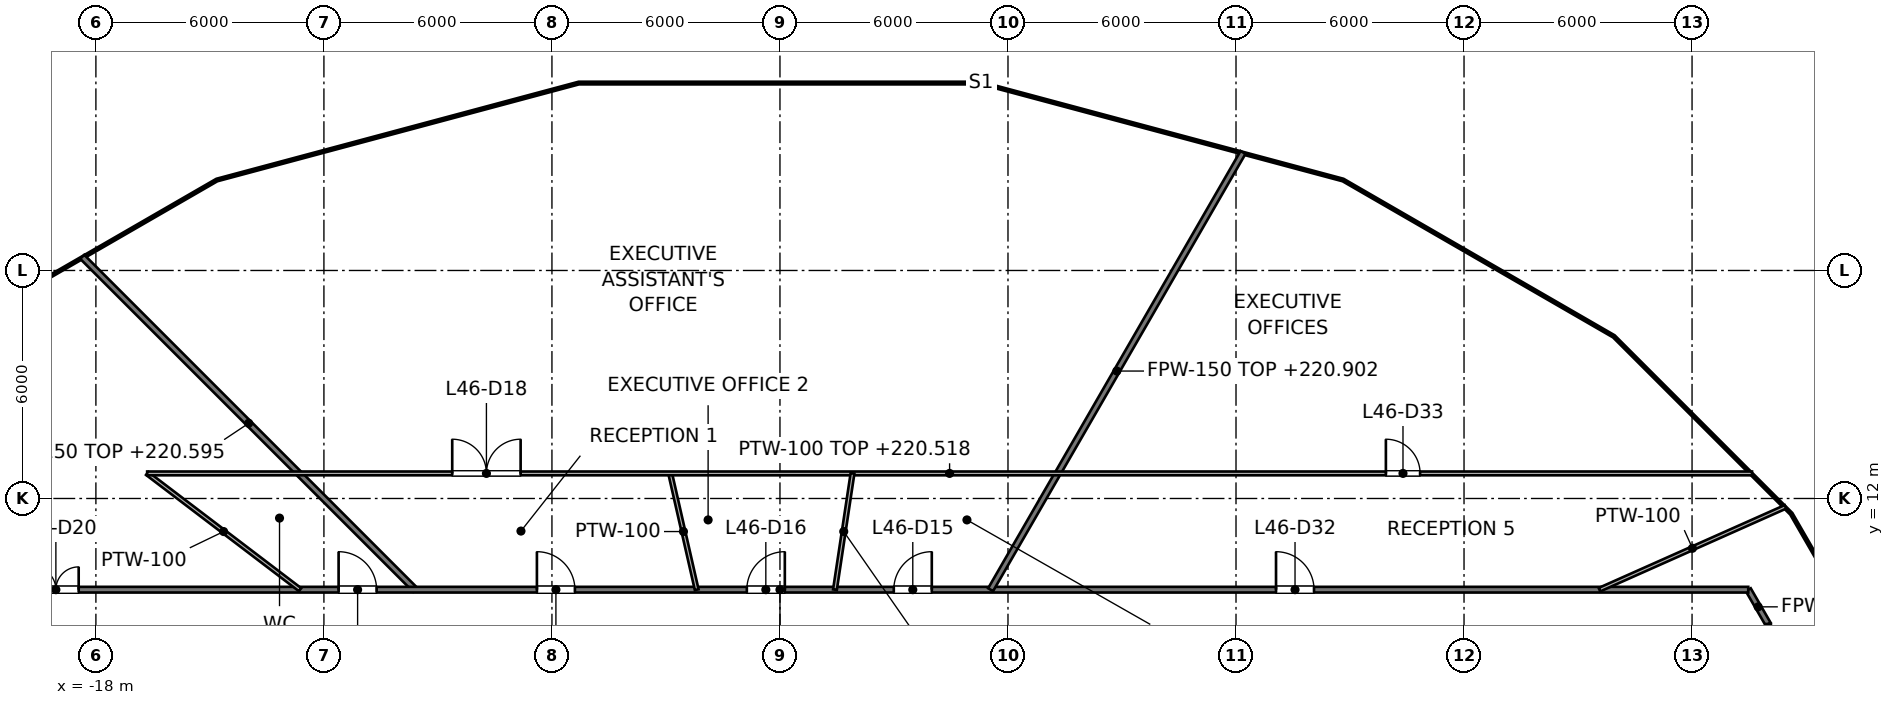
"""IFC4 building model, lengths in metres.
Left out: names, types, materials, properties, quantities, classifications, styles, units other than length and angle.
Written with IfcOpenShell. Run it as: python <this file> out.ifc"""

import sys

from ifc_helpers import new_model, si_unit, direction, frame, frame_2d, origin, place, context, subcontext, project, spatial, rectangle, extrude, element, fill, save


model = new_model("IFC4")
c1 = context("Model", 3, precision=1e-05, world=origin(), true_north=direction((0.0, 1.0)))
c2 = subcontext(c1, "Body", "Model", "MODEL_VIEW")
j1 = project(units=[si_unit("LENGTHUNIT", "METRE"), si_unit("PLANEANGLEUNIT", "RADIAN")], contexts=[c1])
p1 = place(None, origin())
s1 = spatial("IfcSite", under=j1, at=p1, CompositionType="ELEMENT")
p2 = place(p1, origin())
s2 = spatial("IfcBuilding", under=s1, at=p2, CompositionType="ELEMENT")
p3 = place(p2, frame((0.0, 0.0, 217.6)))
s3 = spatial("IfcBuildingStorey", under=s2, at=p3, CompositionType="ELEMENT", Elevation=217.6)
p4 = place(p3, frame((25.479, 9.6, 0.0), z_axis=(0.0, 0.0, 1.0), x_axis=(0.499715696113, -0.8661894845, 0.0)))
e1 = element("IfcWall", 1, at=p4, inside=s3, PredefinedType="PARTITIONING", context=c2, shape_type="SweptSolid", body=[
    extrude(rectangle(XDim=1.042, YDim=0.15, at=frame_2d((0.521, 0.0))), origin(), (0.0, 0.0, 1.0), 2.927),
])
p5 = place(p3, frame((-18.359, 18.359, 0.0), z_axis=(0.0, 0.0, 1.0), x_axis=(0.707106781187, -0.707106781187, 0.0)))
e2 = element("IfcWall", 2, at=p5, inside=s3, PredefinedType="PARTITIONING", context=c2, shape_type="SweptSolid", body=[
    extrude(rectangle(XDim=12.387, YDim=0.15, at=frame_2d((6.193, 0.0))), origin(), (0.0, 0.0, 1.0), 2.995),
])
p6 = place(p3, frame((-25.479, 9.6, 0.0), z_axis=(0.0, 0.0, 1.0), x_axis=(1.0, 0.0, 0.0)))
e3 = element("IfcWall", 3, at=p6, inside=s3, PredefinedType="PARTITIONING", context=c2, shape_type="SweptSolid", body=[
    extrude(rectangle(XDim=50.958, YDim=0.15, at=frame_2d((25.479, 0.0))), origin(), (0.0, 0.0, 1.0), 2.918),
])
p7 = place(p6, frame((28.474, 0.0, 0.0)))
e4 = element("IfcOpeningElement", 4, at=p7, cuts=e3, PredefinedType="OPENING", context=c2, shape_type="SweptSolid", body=[
    extrude(rectangle(XDim=1.0, YDim=2.1, at=frame_2d((0.5, 1.05))), frame((0.0, 0.075, 0.0), z_axis=(0.0, -1.0, 0.0), x_axis=(1.0, 0.0, 0.0)), (0.0, 0.0, 1.0), 0.15),
])
p8 = place(p6, frame((24.607, 0.0, 0.0)))
e5 = element("IfcOpeningElement", 5, at=p8, cuts=e3, PredefinedType="OPENING", context=c2, shape_type="SweptSolid", body=[
    extrude(rectangle(XDim=1.0, YDim=2.1, at=frame_2d((0.5, 1.05))), frame((0.0, 0.075, 0.0), z_axis=(0.0, -1.0, 0.0), x_axis=(1.0, 0.0, 0.0)), (0.0, 0.0, 1.0), 0.15),
])
p9 = place(p6, frame((19.083, 0.0, 0.0)))
e6 = element("IfcOpeningElement", 6, at=p9, cuts=e3, PredefinedType="OPENING", context=c2, shape_type="SweptSolid", body=[
    extrude(rectangle(XDim=1.0, YDim=2.1, at=frame_2d((0.5, 1.05))), frame((0.0, 0.075, 0.0), z_axis=(0.0, -1.0, 0.0), x_axis=(1.0, 0.0, 0.0)), (0.0, 0.0, 1.0), 0.15),
])
p10 = place(p6, frame((13.865, 0.0, 0.0)))
e7 = element("IfcOpeningElement", 7, at=p10, cuts=e3, PredefinedType="OPENING", context=c2, shape_type="SweptSolid", body=[
    extrude(rectangle(XDim=1.0, YDim=2.1, at=frame_2d((0.5, 1.05))), frame((0.0, 0.075, 0.0), z_axis=(0.0, -1.0, 0.0), x_axis=(1.0, 0.0, 0.0)), (0.0, 0.0, 1.0), 0.15),
])
p11 = place(p6, frame((5.826, 0.0, 0.0)))
e8 = element("IfcOpeningElement", 8, at=p11, cuts=e3, PredefinedType="OPENING", context=c2, shape_type="SweptSolid", body=[
    extrude(rectangle(XDim=1.2, YDim=2.1, at=frame_2d((0.6, 1.05))), frame((0.0, 0.075, 0.0), z_axis=(0.0, -1.0, 0.0), x_axis=(1.0, 0.0, 0.0)), (0.0, 0.0, 1.0), 0.15),
])
p12 = place(p6, frame((38.532, 0.0, 0.0)))
e9 = element("IfcOpeningElement", 9, at=p12, cuts=e3, PredefinedType="OPENING", context=c2, shape_type="SweptSolid", body=[
    extrude(rectangle(XDim=1.0, YDim=2.1, at=frame_2d((0.5, 1.05))), frame((0.0, 0.075, 0.0), z_axis=(0.0, -1.0, 0.0), x_axis=(1.0, 0.0, 0.0)), (0.0, 0.0, 1.0), 0.15),
])
p13 = place(p3, frame((5.543, 9.6, 0.0), z_axis=(0.0, 0.0, 1.0), x_axis=(0.499894249903, 0.866086450023, 0.0)))
e10 = element("IfcWall", 10, at=p13, inside=s3, PredefinedType="PARTITIONING", context=c2, shape_type="SweptSolid", body=[
    extrude(rectangle(XDim=13.286, YDim=0.15, at=frame_2d((6.643, 0.0))), origin(), (0.0, 0.0, 1.0), 3.302),
])
p14 = place(p3, frame((26.0, 6.8, 0.0), z_axis=(0.0, 0.0, 1.0), x_axis=(0.0, 1.0, 0.0)))
e11 = element("IfcWall", 11, at=p14, inside=s3, PredefinedType="PARTITIONING", context=c2, shape_type="SweptSolid", body=[
    extrude(rectangle(XDim=1.897, YDim=0.15, at=frame_2d((0.948, 0.0))), origin(), (0.0, 0.0, 1.0), 2.927),
])
p15 = place(p3, frame((-2.889, 12.66, 0.0), z_axis=(0.0, 0.0, 1.0), x_axis=(0.222404443897, -0.974954492956, 0.0)))
e12 = element("IfcWall", 12, at=p15, inside=s3, PredefinedType="PARTITIONING", context=c2, shape_type="SweptSolid", body=[
    extrude(rectangle(XDim=3.138, YDim=0.1, at=frame_2d((1.569, 0.0))), origin(), (0.0, 0.0, 1.0), 2.927),
])
p16 = place(p3, frame((-16.651, 12.66, 0.0), z_axis=(0.0, 0.0, 1.0), x_axis=(0.796006750332, -0.605287744322, 0.0)))
e13 = element("IfcWall", 13, at=p16, inside=s3, PredefinedType="PARTITIONING", context=c2, shape_type="SweptSolid", body=[
    extrude(rectangle(XDim=5.055, YDim=0.1, at=frame_2d((2.528, 0.0))), origin(), (0.0, 0.0, 1.0), 2.927),
])
p17 = place(p3, frame((-16.651, 12.66, 0.0), z_axis=(0.0, 0.0, 1.0), x_axis=(1.0, 0.0, 0.0)))
e14 = element("IfcWall", 14, at=p17, inside=s3, PredefinedType="PARTITIONING", context=c2, shape_type="SweptSolid", body=[
    extrude(rectangle(XDim=42.229, YDim=0.1, at=frame_2d((21.114, 0.0))), origin(), (0.0, 0.0, 1.0), 2.918),
])
p18 = place(p17, frame((8.027, 0.0, 0.0)))
e15 = element("IfcOpeningElement", 15, at=p18, cuts=e14, PredefinedType="OPENING", context=c2, shape_type="SweptSolid", body=[
    extrude(rectangle(XDim=1.8, YDim=2.1, at=frame_2d((0.9, 1.05))), frame((0.0, 0.05, 0.0), z_axis=(0.0, -1.0, 0.0), x_axis=(1.0, 0.0, 0.0)), (0.0, 0.0, 1.0), 0.1),
])
p19 = place(p17, frame((32.595, 0.0, 0.0)))
e16 = element("IfcOpeningElement", 16, at=p19, cuts=e14, PredefinedType="OPENING", context=c2, shape_type="SweptSolid", body=[
    extrude(rectangle(XDim=0.9, YDim=2.1, at=frame_2d((0.45, 1.05))), frame((0.0, 0.05, 0.0), z_axis=(0.0, -1.0, 0.0), x_axis=(1.0, 0.0, 0.0)), (0.0, 0.0, 1.0), 0.1),
])
p20 = place(p3, frame((21.563, 9.6, 0.0), z_axis=(0.0, 0.0, 1.0), x_axis=(0.913508804139, 0.406818958212, 0.0)))
e17 = element("IfcWall", 17, at=p20, inside=s3, PredefinedType="PARTITIONING", context=c2, shape_type="SweptSolid", body=[
    extrude(rectangle(XDim=5.358, YDim=0.1, at=frame_2d((2.679, 0.0))), origin(), (0.0, 0.0, 1.0), 2.927),
])
p21 = place(p3, frame((1.447, 9.6, 0.0), z_axis=(0.0, 0.0, 1.0), x_axis=(0.149270157498, 0.988796450277, 0.0)))
e18 = element("IfcWall", 18, at=p21, inside=s3, PredefinedType="PARTITIONING", context=c2, shape_type="SweptSolid", body=[
    extrude(rectangle(XDim=3.094, YDim=0.1, at=frame_2d((1.547, 0.0))), origin(), (0.0, 0.0, 1.0), 3.85),
])
p22 = place(p7, origin())
e19 = element("IfcDoor", 19, at=p22, inside=s3, OperationType="SINGLE_SWING_RIGHT", PredefinedType="DOOR", context=c2, shape_type="SweptSolid", body=[
    extrude(rectangle(XDim=1.0, YDim=2.1, at=frame_2d((0.5, 1.05))), frame((0.0, 0.025, 0.0), z_axis=(0.0, -1.0, 0.0), x_axis=(1.0, 0.0, 0.0)), (0.0, 0.0, 1.0), 0.05),
])
fill(e4, e19)
p23 = place(p8, origin())
e20 = element("IfcDoor", 20, at=p23, inside=s3, OperationType="SINGLE_SWING_RIGHT", PredefinedType="DOOR", context=c2, shape_type="SweptSolid", body=[
    extrude(rectangle(XDim=1.0, YDim=2.1, at=frame_2d((0.5, 1.05))), frame((0.0, 0.025, 0.0), z_axis=(0.0, -1.0, 0.0), x_axis=(1.0, 0.0, 0.0)), (0.0, 0.0, 1.0), 0.05),
])
fill(e5, e20)
p24 = place(p9, origin())
e21 = element("IfcDoor", 21, at=p24, inside=s3, OperationType="SINGLE_SWING_LEFT", PredefinedType="DOOR", context=c2, shape_type="SweptSolid", body=[
    extrude(rectangle(XDim=1.0, YDim=2.1, at=frame_2d((0.5, 1.05))), frame((0.0, 0.025, 0.0), z_axis=(0.0, -1.0, 0.0), x_axis=(1.0, 0.0, 0.0)), (0.0, 0.0, 1.0), 0.05),
])
fill(e6, e21)
p25 = place(p18, origin())
e22 = element("IfcDoor", 22, at=p25, inside=s3, OperationType="DOUBLE_DOOR_SINGLE_SWING", PredefinedType="DOOR", context=c2, shape_type="SweptSolid", body=[
    extrude(rectangle(XDim=1.8, YDim=2.1, at=frame_2d((0.9, 1.05))), frame((0.0, 0.025, 0.0), z_axis=(0.0, -1.0, 0.0), x_axis=(1.0, 0.0, 0.0)), (0.0, 0.0, 1.0), 0.05),
])
fill(e15, e22)
p26 = place(p10, origin())
e23 = element("IfcDoor", 23, at=p26, inside=s3, OperationType="SINGLE_SWING_LEFT", PredefinedType="DOOR", context=c2, shape_type="SweptSolid", body=[
    extrude(rectangle(XDim=1.0, YDim=2.1, at=frame_2d((0.5, 1.05))), frame((0.0, 0.025, 0.0), z_axis=(0.0, -1.0, 0.0), x_axis=(1.0, 0.0, 0.0)), (0.0, 0.0, 1.0), 0.05),
])
fill(e7, e23)
p27 = place(p11, origin())
e24 = element("IfcDoor", 24, at=p27, inside=s3, OperationType="DOUBLE_DOOR_SINGLE_SWING", PredefinedType="DOOR", context=c2, shape_type="SweptSolid", body=[
    extrude(rectangle(XDim=1.2, YDim=2.1, at=frame_2d((0.6, 1.05))), frame((0.0, 0.025, 0.0), z_axis=(0.0, -1.0, 0.0), x_axis=(1.0, 0.0, 0.0)), (0.0, 0.0, 1.0), 0.05),
])
fill(e8, e24)
p28 = place(p12, origin())
e25 = element("IfcDoor", 25, at=p28, inside=s3, OperationType="SINGLE_SWING_LEFT", PredefinedType="DOOR", context=c2, shape_type="SweptSolid", body=[
    extrude(rectangle(XDim=1.0, YDim=2.1, at=frame_2d((0.5, 1.05))), frame((0.0, 0.025, 0.0), z_axis=(0.0, -1.0, 0.0), x_axis=(1.0, 0.0, 0.0)), (0.0, 0.0, 1.0), 0.05),
])
fill(e9, e25)
p29 = place(p19, origin())
e26 = element("IfcDoor", 26, at=p29, inside=s3, OperationType="SINGLE_SWING_LEFT", PredefinedType="DOOR", context=c2, shape_type="SweptSolid", body=[
    extrude(rectangle(XDim=0.9, YDim=2.1, at=frame_2d((0.45, 1.05))), frame((0.0, 0.025, 0.0), z_axis=(0.0, -1.0, 0.0), x_axis=(1.0, 0.0, 0.0)), (0.0, 0.0, 1.0), 0.05),
])
fill(e16, e26)
save(model, sys.argv[1])
